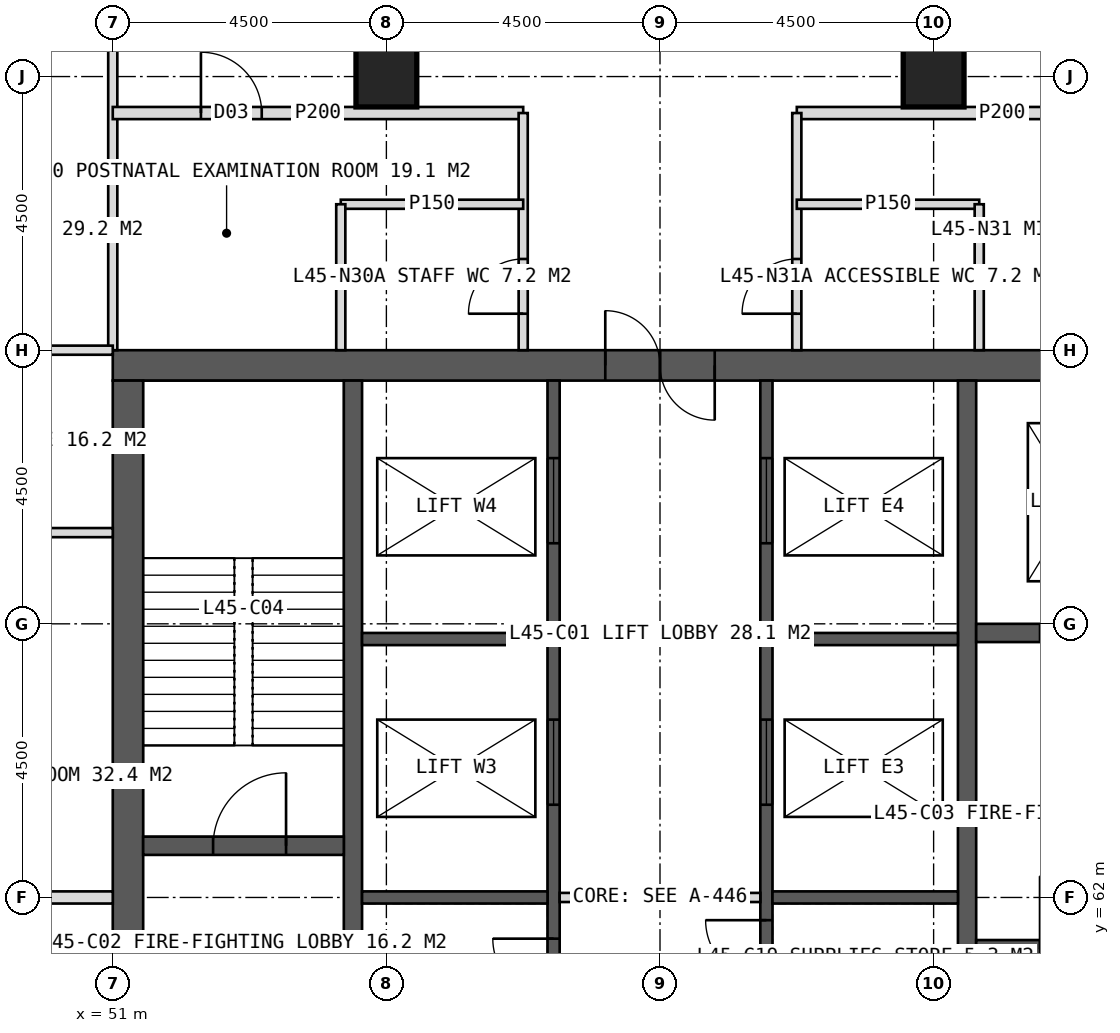
"""IFC4 building model, lengths in metres.
Left out: names, types, materials, properties, quantities, classifications, styles, units other than length and angle.
Written with IfcOpenShell. Run it as: python <this file> out.ifc"""

import sys

from ifc_helpers import new_model, si_unit, direction, frame, frame_2d, origin, origin_2d, place, context, subcontext, project, spatial, rectangle, hollow_rectangle, extrude, element, fill, save


model = new_model("IFC4")
c1 = context("Model", 3, precision=1e-05, world=origin(), true_north=direction((0.0, 1.0)))
c2 = subcontext(c1, "Body", "Model", "MODEL_VIEW")
j1 = project(units=[si_unit("LENGTHUNIT", "METRE"), si_unit("PLANEANGLEUNIT", "RADIAN")], contexts=[c1])
p1 = place(None, origin())
s1 = spatial("IfcSite", under=j1, at=p1, CompositionType="ELEMENT")
p2 = place(p1, origin())
s2 = spatial("IfcBuilding", under=s1, at=p2, CompositionType="ELEMENT")
p3 = place(p2, frame((0.0, 0.0, 189.0)))
s3 = spatial("IfcBuildingStorey", under=s2, at=p3, CompositionType="ELEMENT", Elevation=189.0)
p4 = place(p3, frame((51.0, 70.75, 0.0), z_axis=(0.0, 0.0, 1.0), x_axis=(1.0, 0.0, 0.0)))
e1 = element("IfcWall", 1, at=p4, inside=s3, PredefinedType="SHEAR", context=c2, shape_type="SweptSolid", body=[
    extrude(rectangle(XDim=18.0, YDim=0.5, at=frame_2d((9.0, 0.0))), origin(), (0.0, 0.0, 1.0), 4.0),
])
p5 = place(p4, frame((8.1, 0.0, 0.0)))
e2 = element("IfcOpeningElement", 2, at=p5, cuts=e1, PredefinedType="OPENING", context=c2, shape_type="SweptSolid", body=[
    extrude(rectangle(XDim=1.8, YDim=2.2, at=frame_2d((0.9, 1.1))), frame((0.0, 0.26, 0.0), z_axis=(0.0, -1.0, 0.0), x_axis=(1.0, 0.0, 0.0)), (0.0, 0.0, 1.0), 0.52),
])
p6 = place(p3, frame((51.25, 53.5, 0.0), z_axis=(0.0, 0.0, 1.0), x_axis=(0.0, 1.0, 0.0)))
e3 = element("IfcWall", 3, at=p6, inside=s3, PredefinedType="SHEAR", context=c2, shape_type="SweptSolid", body=[
    extrude(rectangle(XDim=17.0, YDim=0.5, at=frame_2d((8.5, 0.0))), origin(), (0.0, 0.0, 1.0), 4.0),
])
p7 = place(p6, frame((6.1, 0.0, 0.0)))
e4 = element("IfcOpeningElement", 4, at=p7, cuts=e3, PredefinedType="OPENING", context=c2, shape_type="SweptSolid", body=[
    extrude(rectangle(XDim=1.5, YDim=2.2, at=frame_2d((0.75, 1.1))), frame((0.0, 0.26, 0.0), z_axis=(0.0, -1.0, 0.0), x_axis=(1.0, 0.0, 0.0)), (0.0, 0.0, 1.0), 0.52),
])
for number, where, z_axis, x_axis in (
    (5, (54.95, 53.5, 0.0), (0.0, 0.0, 1.0), (0.0, 1.0, 0.0)),
    (6, (65.05, 53.5, 0.0), (0.0, 0.0, 1.0), (0.0, 1.0, 0.0)),
):
    element("IfcWall", number, at=place(p3, frame(where, z_axis=z_axis, x_axis=x_axis)), inside=s3, PredefinedType="SHEAR", context=c2, shape_type="SweptSolid", body=[
        extrude(rectangle(XDim=17.0, YDim=0.3, at=frame_2d((8.5, 0.0))), origin(), (0.0, 0.0, 1.0), 4.0),
    ])
p8 = place(p3, frame((58.25, 53.5, 0.0), z_axis=(0.0, 0.0, 1.0), x_axis=(0.0, 1.0, 0.0)))
e7 = element("IfcWall", 7, at=p8, inside=s3, PredefinedType="SHEAR", context=c2, shape_type="SweptSolid", body=[
    extrude(rectangle(XDim=17.0, YDim=0.2, at=frame_2d((8.5, 0.0))), origin(), (0.0, 0.0, 1.0), 4.0),
])
p9 = place(p8, frame((0.808, 0.0, 0.0)))
e8 = element("IfcOpeningElement", 8, at=p9, cuts=e7, PredefinedType="OPENING", context=c2, shape_type="SweptSolid", body=[
    extrude(rectangle(XDim=1.0, YDim=2.1, at=frame_2d((0.5, 1.05))), frame((0.0, 0.11, 0.0), z_axis=(0.0, -1.0, 0.0), x_axis=(1.0, 0.0, 0.0)), (0.0, 0.0, 1.0), 0.22),
])
p10 = place(p8, frame((2.958, 0.0, 0.0)))
e9 = element("IfcOpeningElement", 9, at=p10, cuts=e7, PredefinedType="OPENING", context=c2, shape_type="SweptSolid", body=[
    extrude(rectangle(XDim=1.0, YDim=2.1, at=frame_2d((0.5, 1.05))), frame((0.0, 0.11, 0.0), z_axis=(0.0, -1.0, 0.0), x_axis=(1.0, 0.0, 0.0)), (0.0, 0.0, 1.0), 0.22),
])
p11 = place(p8, frame((4.722, 0.0, 0.0)))
e10 = element("IfcOpeningElement", 10, at=p11, cuts=e7, PredefinedType="OPENING", context=c2, shape_type="SweptSolid", body=[
    extrude(rectangle(XDim=1.0, YDim=2.1, at=frame_2d((0.5, 1.05))), frame((0.0, 0.11, 0.0), z_axis=(0.0, -1.0, 0.0), x_axis=(1.0, 0.0, 0.0)), (0.0, 0.0, 1.0), 0.22),
])
p12 = place(p8, frame((6.823, 0.0, 0.0)))
e11 = element("IfcOpeningElement", 11, at=p12, cuts=e7, PredefinedType="OPENING", context=c2, shape_type="SweptSolid", body=[
    extrude(rectangle(XDim=1.0, YDim=2.1, at=frame_2d((0.5, 1.05))), frame((0.0, 0.11, 0.0), z_axis=(0.0, -1.0, 0.0), x_axis=(1.0, 0.0, 0.0)), (0.0, 0.0, 1.0), 0.22),
])
p13 = place(p8, frame((10.025, 0.0, 0.0)))
e12 = element("IfcOpeningElement", 12, at=p13, cuts=e7, PredefinedType="OPENING", context=c2, shape_type="SweptSolid", body=[
    extrude(rectangle(XDim=1.4, YDim=2.2, at=frame_2d((0.7, 1.1))), frame((0.0, 0.11, 0.0), z_axis=(0.0, -1.0, 0.0), x_axis=(1.0, 0.0, 0.0)), (0.0, 0.0, 1.0), 0.22),
])
p14 = place(p8, frame((14.325, 0.0, 0.0)))
e13 = element("IfcOpeningElement", 13, at=p14, cuts=e7, PredefinedType="OPENING", context=c2, shape_type="SweptSolid", body=[
    extrude(rectangle(XDim=1.4, YDim=2.2, at=frame_2d((0.7, 1.1))), frame((0.0, 0.11, 0.0), z_axis=(0.0, -1.0, 0.0), x_axis=(1.0, 0.0, 0.0)), (0.0, 0.0, 1.0), 0.22),
])
p15 = place(p3, frame((61.75, 53.5, 0.0), z_axis=(0.0, 0.0, 1.0), x_axis=(0.0, 1.0, 0.0)))
e14 = element("IfcWall", 14, at=p15, inside=s3, PredefinedType="SHEAR", context=c2, shape_type="SweptSolid", body=[
    extrude(rectangle(XDim=17.0, YDim=0.2, at=frame_2d((8.5, 0.0))), origin(), (0.0, 0.0, 1.0), 4.0),
])
p16 = place(p15, frame((0.496, 0.0, 0.0)))
e15 = element("IfcOpeningElement", 15, at=p16, cuts=e14, PredefinedType="OPENING", context=c2, shape_type="SweptSolid", body=[
    extrude(rectangle(XDim=1.0, YDim=2.1, at=frame_2d((0.5, 1.05))), frame((0.0, 0.11, 0.0), z_axis=(0.0, -1.0, 0.0), x_axis=(1.0, 0.0, 0.0)), (0.0, 0.0, 1.0), 0.22),
])
p17 = place(p15, frame((2.646, 0.0, 0.0)))
e16 = element("IfcOpeningElement", 16, at=p17, cuts=e14, PredefinedType="OPENING", context=c2, shape_type="SweptSolid", body=[
    extrude(rectangle(XDim=1.0, YDim=2.1, at=frame_2d((0.5, 1.05))), frame((0.0, 0.11, 0.0), z_axis=(0.0, -1.0, 0.0), x_axis=(1.0, 0.0, 0.0)), (0.0, 0.0, 1.0), 0.22),
])
p18 = place(p15, frame((5.027, 0.0, 0.0)))
e17 = element("IfcOpeningElement", 17, at=p18, cuts=e14, PredefinedType="OPENING", context=c2, shape_type="SweptSolid", body=[
    extrude(rectangle(XDim=1.0, YDim=2.1, at=frame_2d((0.5, 1.05))), frame((0.0, 0.11, 0.0), z_axis=(0.0, -1.0, 0.0), x_axis=(1.0, 0.0, 0.0)), (0.0, 0.0, 1.0), 0.22),
])
p19 = place(p15, frame((7.126, 0.0, 0.0)))
e18 = element("IfcOpeningElement", 18, at=p19, cuts=e14, PredefinedType="OPENING", context=c2, shape_type="SweptSolid", body=[
    extrude(rectangle(XDim=1.0, YDim=2.1, at=frame_2d((0.5, 1.05))), frame((0.0, 0.11, 0.0), z_axis=(0.0, -1.0, 0.0), x_axis=(1.0, 0.0, 0.0)), (0.0, 0.0, 1.0), 0.22),
])
p20 = place(p15, frame((10.025, 0.0, 0.0)))
e19 = element("IfcOpeningElement", 19, at=p20, cuts=e14, PredefinedType="OPENING", context=c2, shape_type="SweptSolid", body=[
    extrude(rectangle(XDim=1.4, YDim=2.2, at=frame_2d((0.7, 1.1))), frame((0.0, 0.11, 0.0), z_axis=(0.0, -1.0, 0.0), x_axis=(1.0, 0.0, 0.0)), (0.0, 0.0, 1.0), 0.22),
])
p21 = place(p15, frame((14.325, 0.0, 0.0)))
e20 = element("IfcOpeningElement", 20, at=p21, cuts=e14, PredefinedType="OPENING", context=c2, shape_type="SweptSolid", body=[
    extrude(rectangle(XDim=1.4, YDim=2.2, at=frame_2d((0.7, 1.1))), frame((0.0, 0.11, 0.0), z_axis=(0.0, -1.0, 0.0), x_axis=(1.0, 0.0, 0.0)), (0.0, 0.0, 1.0), 0.22),
])
for number, where, z_axis, x_axis in (
    (21, (55.1, 62.0, 0.0), (0.0, 0.0, 1.0), (1.0, 0.0, 0.0)),
    (22, (61.85, 62.0, 0.0), (0.0, 0.0, 1.0), (1.0, 0.0, 0.0)),
    (23, (55.1, 66.25, 0.0), (0.0, 0.0, 1.0), (1.0, 0.0, 0.0)),
    (24, (61.85, 66.25, 0.0), (0.0, 0.0, 1.0), (1.0, 0.0, 0.0)),
):
    element("IfcWall", number, at=place(p3, frame(where, z_axis=z_axis, x_axis=x_axis)), inside=s3, PredefinedType="SHEAR", context=c2, shape_type="SweptSolid", body=[
        extrude(rectangle(XDim=3.05, YDim=0.2, at=frame_2d((1.525, 0.0))), origin(), (0.0, 0.0, 1.0), 4.0),
    ])
p22 = place(p3, frame((51.5, 62.85, 0.0), z_axis=(0.0, 0.0, 1.0), x_axis=(1.0, 0.0, 0.0)))
e25 = element("IfcWall", 25, at=p22, inside=s3, PredefinedType="SHEAR", context=c2, shape_type="SweptSolid", body=[
    extrude(rectangle(XDim=3.3, YDim=0.3, at=frame_2d((1.65, 0.0))), origin(), (0.0, 0.0, 1.0), 4.0),
])
p23 = place(p22, frame((1.15, 0.0, 0.0)))
e26 = element("IfcOpeningElement", 26, at=p23, cuts=e25, PredefinedType="OPENING", context=c2, shape_type="SweptSolid", body=[
    extrude(rectangle(XDim=1.2, YDim=2.1, at=frame_2d((0.6, 1.05))), frame((0.0, 0.16, 0.0), z_axis=(0.0, -1.0, 0.0), x_axis=(1.0, 0.0, 0.0)), (0.0, 0.0, 1.0), 0.32),
])
p24 = place(p3, frame((65.2, 61.15, 0.0), z_axis=(0.0, 0.0, 1.0), x_axis=(1.0, 0.0, 0.0)))
e27 = element("IfcWall", 27, at=p24, inside=s3, PredefinedType="SHEAR", context=c2, shape_type="SweptSolid", body=[
    extrude(rectangle(XDim=3.3, YDim=0.3, at=frame_2d((1.65, 0.0))), origin(), (0.0, 0.0, 1.0), 4.0),
])
p25 = place(p24, frame((1.05, 0.0, 0.0)))
e28 = element("IfcOpeningElement", 28, at=p25, cuts=e27, PredefinedType="OPENING", context=c2, shape_type="SweptSolid", body=[
    extrude(rectangle(XDim=1.2, YDim=2.1, at=frame_2d((0.6, 1.05))), frame((0.0, 0.16, 0.0), z_axis=(0.0, -1.0, 0.0), x_axis=(1.0, 0.0, 0.0)), (0.0, 0.0, 1.0), 0.32),
])
p26 = place(p3, frame((65.2, 66.35, 0.0), z_axis=(0.0, 0.0, 1.0), x_axis=(1.0, 0.0, 0.0)))
e29 = element("IfcWall", 29, at=p26, inside=s3, PredefinedType="SHEAR", context=c2, shape_type="SweptSolid", body=[
    extrude(rectangle(XDim=3.3, YDim=0.3, at=frame_2d((1.65, 0.0))), origin(), (0.0, 0.0, 1.0), 4.0),
])
p27 = place(p26, frame((1.05, 0.0, 0.0)))
e30 = element("IfcOpeningElement", 30, at=p27, cuts=e29, PredefinedType="OPENING", context=c2, shape_type="SweptSolid", body=[
    extrude(rectangle(XDim=1.2, YDim=2.2, at=frame_2d((0.6, 1.1))), frame((0.0, 0.16, 0.0), z_axis=(0.0, -1.0, 0.0), x_axis=(1.0, 0.0, 0.0)), (0.0, 0.0, 1.0), 0.32),
])
for number, where, z_axis, x_axis in (
    (31, (55.5, 75.5, 0.0), (0.0, 0.0, 1.0), (1.0, 0.0, 0.0)),
    (32, (64.5, 75.5, 0.0), (0.0, 0.0, 1.0), (1.0, 0.0, 0.0)),
):
    element("IfcColumn", number, at=place(p3, frame(where, z_axis=z_axis, x_axis=x_axis)), inside=s3, PredefinedType="COLUMN", context=c2, shape_type="SweptSolid", body=[
        extrude(hollow_rectangle(XDim=1.0, YDim=1.0, WallThickness=0.1, at=origin_2d()), origin(), (0.0, 0.0, 1.0), 4.0),
    ])
p28 = place(p3, frame((51.0, 71.0, 0.0), z_axis=(0.0, 0.0, 1.0), x_axis=(0.0, 1.0, 0.0)))
e33 = element("IfcWall", 33, at=p28, inside=s3, PredefinedType="PARTITIONING", context=c2, shape_type="SweptSolid", body=[
    extrude(rectangle(XDim=5.4, YDim=0.15, at=frame_2d((2.7, 0.0))), origin(), (0.0, 0.0, 1.0), 3.75),
])
p29 = place(p3, frame((51.0, 74.9, 0.0), z_axis=(0.0, 0.0, 1.0), x_axis=(1.0, 0.0, 0.0)))
e34 = element("IfcWall", 34, at=p29, inside=s3, PredefinedType="PARTITIONING", context=c2, shape_type="SweptSolid", body=[
    extrude(rectangle(XDim=6.75, YDim=0.2, at=frame_2d((3.375, 0.0))), origin(), (0.0, 0.0, 1.0), 3.75),
])
p30 = place(p29, frame((1.45, 0.0, 0.0)))
e35 = element("IfcOpeningElement", 35, at=p30, cuts=e34, PredefinedType="OPENING", context=c2, shape_type="SweptSolid", body=[
    extrude(rectangle(XDim=1.0, YDim=2.1, at=frame_2d((0.5, 1.05))), frame((0.0, 0.11, 0.0), z_axis=(0.0, -1.0, 0.0), x_axis=(1.0, 0.0, 0.0)), (0.0, 0.0, 1.0), 0.22),
])
p31 = place(p3, frame((62.25, 74.9, 0.0), z_axis=(0.0, 0.0, 1.0), x_axis=(1.0, 0.0, 0.0)))
e36 = element("IfcWall", 36, at=p31, inside=s3, PredefinedType="PARTITIONING", context=c2, shape_type="SweptSolid", body=[
    extrude(rectangle(XDim=6.75, YDim=0.2, at=frame_2d((3.375, 0.0))), origin(), (0.0, 0.0, 1.0), 3.75),
])
p32 = place(p31, frame((4.3, 0.0, 0.0)))
e37 = element("IfcOpeningElement", 37, at=p32, cuts=e36, PredefinedType="OPENING", context=c2, shape_type="SweptSolid", body=[
    extrude(rectangle(XDim=1.0, YDim=2.1, at=frame_2d((0.5, 1.05))), frame((0.0, 0.11, 0.0), z_axis=(0.0, -1.0, 0.0), x_axis=(1.0, 0.0, 0.0)), (0.0, 0.0, 1.0), 0.22),
])
p33 = place(p3, frame((57.75, 71.0, 0.0), z_axis=(0.0, 0.0, 1.0), x_axis=(0.0, 1.0, 0.0)))
e38 = element("IfcWall", 38, at=p33, inside=s3, PredefinedType="PARTITIONING", context=c2, shape_type="SweptSolid", body=[
    extrude(rectangle(XDim=3.9, YDim=0.15, at=frame_2d((1.95, 0.0))), origin(), (0.0, 0.0, 1.0), 3.75),
])
p34 = place(p33, frame((0.6, 0.0, 0.0)))
e39 = element("IfcOpeningElement", 39, at=p34, cuts=e38, PredefinedType="OPENING", context=c2, shape_type="SweptSolid", body=[
    extrude(rectangle(XDim=0.9, YDim=2.1, at=frame_2d((0.45, 1.05))), frame((0.0, 0.085, 0.0), z_axis=(0.0, -1.0, 0.0), x_axis=(1.0, 0.0, 0.0)), (0.0, 0.0, 1.0), 0.17),
])
p35 = place(p3, frame((62.25, 71.0, 0.0), z_axis=(0.0, 0.0, 1.0), x_axis=(0.0, 1.0, 0.0)))
e40 = element("IfcWall", 40, at=p35, inside=s3, PredefinedType="PARTITIONING", context=c2, shape_type="SweptSolid", body=[
    extrude(rectangle(XDim=3.9, YDim=0.15, at=frame_2d((1.95, 0.0))), origin(), (0.0, 0.0, 1.0), 3.75),
])
p36 = place(p35, frame((0.6, 0.0, 0.0)))
e41 = element("IfcOpeningElement", 41, at=p36, cuts=e40, PredefinedType="OPENING", context=c2, shape_type="SweptSolid", body=[
    extrude(rectangle(XDim=0.9, YDim=2.1, at=frame_2d((0.45, 1.05))), frame((0.0, 0.085, 0.0), z_axis=(0.0, -1.0, 0.0), x_axis=(1.0, 0.0, 0.0)), (0.0, 0.0, 1.0), 0.17),
])
p37 = place(p3, frame((54.75, 73.4, 0.0), z_axis=(0.0, 0.0, 1.0), x_axis=(1.0, 0.0, 0.0)))
e42 = element("IfcWall", 42, at=p37, inside=s3, PredefinedType="PARTITIONING", context=c2, shape_type="SweptSolid", body=[
    extrude(rectangle(XDim=3.0, YDim=0.15, at=frame_2d((1.5, 0.0))), origin(), (0.0, 0.0, 1.0), 3.75),
])
p38 = place(p3, frame((54.75, 71.0, 0.0), z_axis=(0.0, 0.0, 1.0), x_axis=(0.0, 1.0, 0.0)))
e43 = element("IfcWall", 43, at=p38, inside=s3, PredefinedType="PARTITIONING", context=c2, shape_type="SweptSolid", body=[
    extrude(rectangle(XDim=2.4, YDim=0.15, at=frame_2d((1.2, 0.0))), origin(), (0.0, 0.0, 1.0), 3.75),
])
p39 = place(p3, frame((62.25, 73.4, 0.0), z_axis=(0.0, 0.0, 1.0), x_axis=(1.0, 0.0, 0.0)))
e44 = element("IfcWall", 44, at=p39, inside=s3, PredefinedType="PARTITIONING", context=c2, shape_type="SweptSolid", body=[
    extrude(rectangle(XDim=3.0, YDim=0.15, at=frame_2d((1.5, 0.0))), origin(), (0.0, 0.0, 1.0), 3.75),
])
p40 = place(p3, frame((65.25, 71.0, 0.0), z_axis=(0.0, 0.0, 1.0), x_axis=(0.0, 1.0, 0.0)))
e45 = element("IfcWall", 45, at=p40, inside=s3, PredefinedType="PARTITIONING", context=c2, shape_type="SweptSolid", body=[
    extrude(rectangle(XDim=2.4, YDim=0.15, at=frame_2d((1.2, 0.0))), origin(), (0.0, 0.0, 1.0), 3.75),
])
p41 = place(p3, frame((51.0, 62.0, 0.0), z_axis=(0.0, 0.0, 1.0), x_axis=(-1.0, 0.0, 0.0)))
e46 = element("IfcWall", 46, at=p41, inside=s3, PredefinedType="SOLIDWALL", context=c2, shape_type="SweptSolid", body=[
    extrude(rectangle(XDim=5.4, YDim=0.2, at=frame_2d((2.7, 0.0))), origin(), (0.0, 0.0, 1.0), 2.95),
])
for number, where, z_axis, x_axis in (
    (47, (51.0, 68.0, 0.0), (0.0, 0.0, 1.0), (-1.0, 0.0, 0.0)),
    (48, (51.0, 71.0, 0.0), (0.0, 0.0, 1.0), (-1.0, 0.0, 0.0)),
):
    element("IfcWall", number, at=place(p3, frame(where, z_axis=z_axis, x_axis=x_axis)), inside=s3, PredefinedType="PARTITIONING", context=c2, shape_type="SweptSolid", body=[
        extrude(rectangle(XDim=5.4, YDim=0.15, at=frame_2d((2.7, 0.0))), origin(), (0.0, 0.0, 1.0), 3.75),
    ])
p42 = place(p3, frame((58.35, 62.0, 0.0), z_axis=(0.0, 0.0, 1.0), x_axis=(1.0, 0.0, 0.0)))
e49 = element("IfcWall", 49, at=p42, inside=s3, PredefinedType="PARTITIONING", context=c2, shape_type="SweptSolid", body=[
    extrude(rectangle(XDim=3.3, YDim=0.15, at=frame_2d((1.65, 0.0))), origin(), (0.0, 0.0, 1.0), 3.75),
])
p43 = place(p34, origin())
e50 = element("IfcDoor", 50, at=p43, inside=s3, OperationType="SINGLE_SWING_LEFT", PredefinedType="DOOR", context=c2, shape_type="SweptSolid", body=[
    extrude(rectangle(XDim=0.9, YDim=2.1, at=frame_2d((0.45, 1.05))), frame((0.0, 0.025, 0.0), z_axis=(0.0, -1.0, 0.0), x_axis=(1.0, 0.0, 0.0)), (0.0, 0.0, 1.0), 0.05),
])
fill(e39, e50)
p44 = place(p30, origin())
e51 = element("IfcDoor", 51, at=p44, inside=s3, OperationType="SINGLE_SWING_LEFT", PredefinedType="DOOR", context=c2, shape_type="SweptSolid", body=[
    extrude(rectangle(XDim=1.0, YDim=2.1, at=frame_2d((0.5, 1.05))), frame((0.0, 0.025, 0.0), z_axis=(0.0, -1.0, 0.0), x_axis=(1.0, 0.0, 0.0)), (0.0, 0.0, 1.0), 0.05),
])
fill(e35, e51)
p45 = place(p36, origin())
e52 = element("IfcDoor", 52, at=p45, inside=s3, OperationType="SINGLE_SWING_LEFT", PredefinedType="DOOR", context=c2, shape_type="SweptSolid", body=[
    extrude(rectangle(XDim=0.9, YDim=2.1, at=frame_2d((0.45, 1.05))), frame((0.0, 0.025, 0.0), z_axis=(0.0, -1.0, 0.0), x_axis=(1.0, 0.0, 0.0)), (0.0, 0.0, 1.0), 0.05),
])
fill(e41, e52)
p46 = place(p5, origin())
e53 = element("IfcDoor", 53, at=p46, inside=s3, OperationType="DOUBLE_DOOR_SINGLE_SWING", PredefinedType="DOOR", context=c2, shape_type="SweptSolid", body=[
    extrude(rectangle(XDim=1.8, YDim=2.2, at=frame_2d((0.9, 1.1))), frame((0.0, 0.025, 0.0), z_axis=(0.0, -1.0, 0.0), x_axis=(1.0, 0.0, 0.0)), (0.0, 0.0, 1.0), 0.05),
])
fill(e2, e53)
p47 = place(p7, origin())
e54 = element("IfcDoor", 54, at=p47, inside=s3, OperationType="DOUBLE_DOOR_SINGLE_SWING", PredefinedType="DOOR", context=c2, shape_type="SweptSolid", body=[
    extrude(rectangle(XDim=1.5, YDim=2.2, at=frame_2d((0.75, 1.1))), frame((0.0, 0.025, 0.0), z_axis=(0.0, -1.0, 0.0), x_axis=(1.0, 0.0, 0.0)), (0.0, 0.0, 1.0), 0.05),
])
fill(e4, e54)
p48 = place(p23, origin())
e55 = element("IfcDoor", 55, at=p48, inside=s3, OperationType="SINGLE_SWING_RIGHT", PredefinedType="DOOR", context=c2, shape_type="SweptSolid", body=[
    extrude(rectangle(XDim=1.2, YDim=2.1, at=frame_2d((0.6, 1.05))), frame((0.0, 0.025, 0.0), z_axis=(0.0, -1.0, 0.0), x_axis=(1.0, 0.0, 0.0)), (0.0, 0.0, 1.0), 0.05),
])
fill(e26, e55)
p49 = place(p12, origin())
e56 = element("IfcDoor", 56, at=p49, inside=s3, OperationType="SINGLE_SWING_RIGHT", PredefinedType="DOOR", context=c2, shape_type="SweptSolid", body=[
    extrude(rectangle(XDim=1.0, YDim=2.1, at=frame_2d((0.5, 1.05))), frame((0.0, 0.025, 0.0), z_axis=(0.0, -1.0, 0.0), x_axis=(1.0, 0.0, 0.0)), (0.0, 0.0, 1.0), 0.05),
])
fill(e11, e56)
p50 = place(p19, origin())
e57 = element("IfcDoor", 57, at=p50, inside=s3, OperationType="SINGLE_SWING_RIGHT", PredefinedType="DOOR", context=c2, shape_type="SweptSolid", body=[
    extrude(rectangle(XDim=1.0, YDim=2.1, at=frame_2d((0.5, 1.05))), frame((0.0, 0.025, 0.0), z_axis=(0.0, -1.0, 0.0), x_axis=(1.0, 0.0, 0.0)), (0.0, 0.0, 1.0), 0.05),
])
fill(e18, e57)
p51 = place(p13, origin())
e58 = element("IfcDoor", 58, at=p51, inside=s3, OperationType="SLIDING_TO_LEFT", PredefinedType="DOOR", context=c2, shape_type="SweptSolid", body=[
    extrude(rectangle(XDim=1.4, YDim=2.2, at=frame_2d((0.7, 1.1))), frame((0.0, 0.025, 0.0), z_axis=(0.0, -1.0, 0.0), x_axis=(1.0, 0.0, 0.0)), (0.0, 0.0, 1.0), 0.05),
])
fill(e12, e58)
p52 = place(p20, origin())
e59 = element("IfcDoor", 59, at=p52, inside=s3, OperationType="SLIDING_TO_LEFT", PredefinedType="DOOR", context=c2, shape_type="SweptSolid", body=[
    extrude(rectangle(XDim=1.4, YDim=2.2, at=frame_2d((0.7, 1.1))), frame((0.0, 0.025, 0.0), z_axis=(0.0, -1.0, 0.0), x_axis=(1.0, 0.0, 0.0)), (0.0, 0.0, 1.0), 0.05),
])
fill(e19, e59)
p53 = place(p14, origin())
e60 = element("IfcDoor", 60, at=p53, inside=s3, OperationType="SLIDING_TO_LEFT", PredefinedType="DOOR", context=c2, shape_type="SweptSolid", body=[
    extrude(rectangle(XDim=1.4, YDim=2.2, at=frame_2d((0.7, 1.1))), frame((0.0, 0.025, 0.0), z_axis=(0.0, -1.0, 0.0), x_axis=(1.0, 0.0, 0.0)), (0.0, 0.0, 1.0), 0.05),
])
fill(e13, e60)
p54 = place(p21, origin())
e61 = element("IfcDoor", 61, at=p54, inside=s3, OperationType="SLIDING_TO_LEFT", PredefinedType="DOOR", context=c2, shape_type="SweptSolid", body=[
    extrude(rectangle(XDim=1.4, YDim=2.2, at=frame_2d((0.7, 1.1))), frame((0.0, 0.025, 0.0), z_axis=(0.0, -1.0, 0.0), x_axis=(1.0, 0.0, 0.0)), (0.0, 0.0, 1.0), 0.05),
])
fill(e20, e61)
save(model, sys.argv[1])
